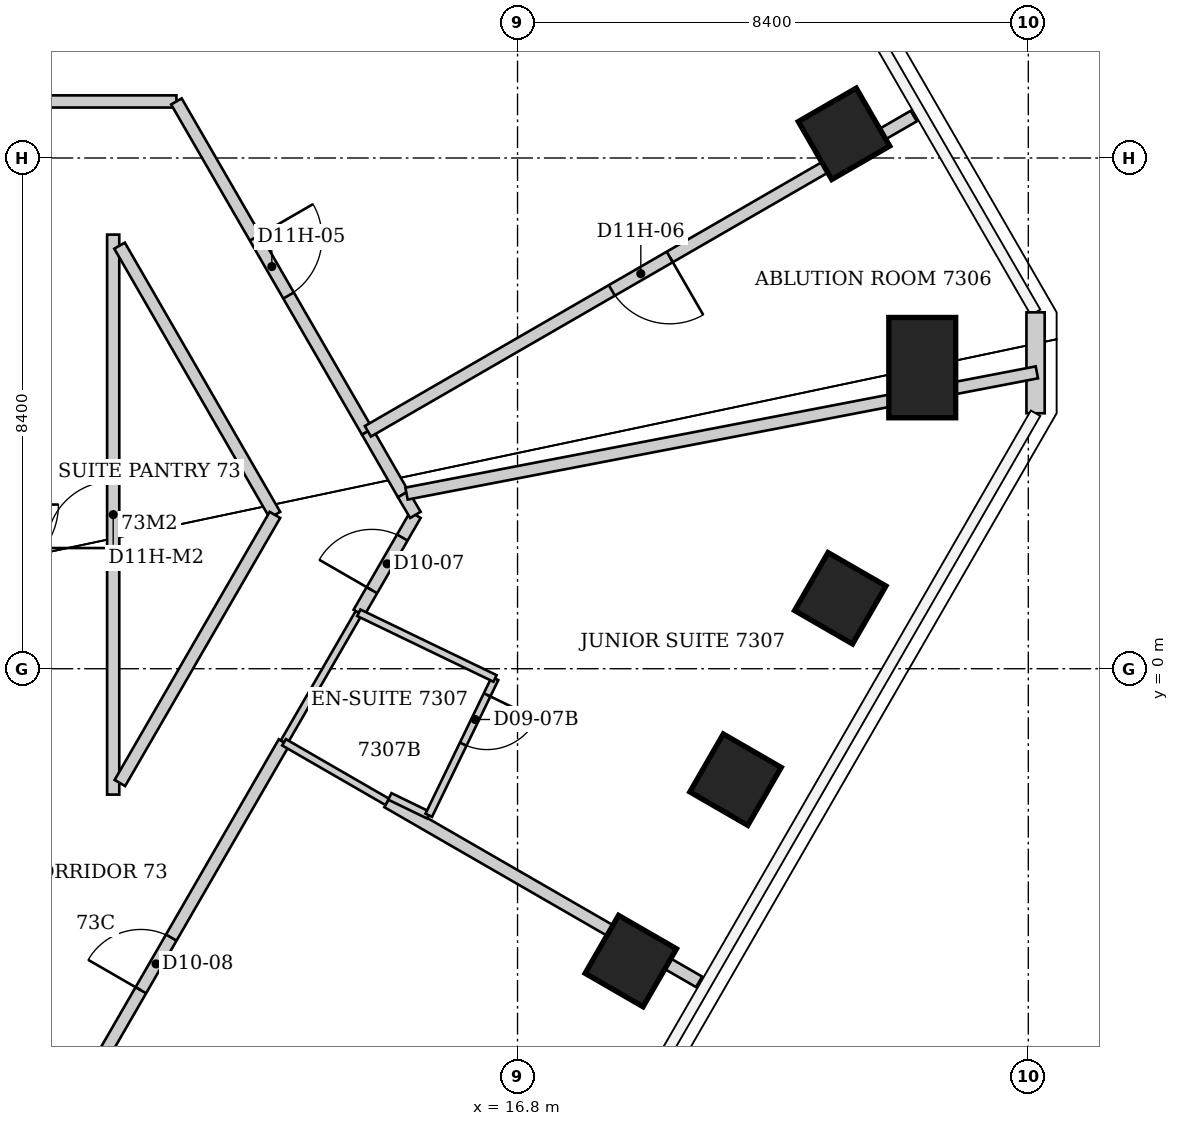
"""IFC4 building model, lengths in metres.
Left out: names, types, materials, properties, quantities, classifications, styles, units other than length and angle.
Written with IfcOpenShell. Run it as: python <this file> out.ifc"""

import sys

from ifc_helpers import new_model, si_unit, direction, frame, frame_2d, origin, origin_2d, place, context, subcontext, project, spatial, rectangle, extrude, element, fill, save


model = new_model("IFC4")
c1 = context("Model", 3, precision=1e-05, world=origin(), true_north=direction((0.0, 1.0)))
c2 = subcontext(c1, "Body", "Model", "MODEL_VIEW")
j1 = project(units=[si_unit("LENGTHUNIT", "METRE"), si_unit("PLANEANGLEUNIT", "RADIAN")], contexts=[c1])
p1 = place(None, origin())
s1 = spatial("IfcSite", under=j1, at=p1, CompositionType="ELEMENT")
p2 = place(p1, origin())
s2 = spatial("IfcBuilding", under=s1, at=p2, CompositionType="ELEMENT")
p3 = place(p2, frame((0.0, 0.0, 291.2)))
s3 = spatial("IfcBuildingStorey", under=s2, at=p3, CompositionType="ELEMENT", Elevation=291.2)
p4 = place(p3, frame((22.169, 8.798, 0.0), z_axis=(0.0, 0.0, 1.0), x_axis=(0.866025403784, 0.5, 0.0)))
e1 = element("IfcColumn", 1, at=p4, inside=s3, PredefinedType="COLUMN", context=c2, shape_type="SweptSolid", body=[
    extrude(rectangle(XDim=1.1, YDim=1.1, at=origin_2d()), origin(), (0.0, 0.0, 1.0), 3.8),
])
p5 = place(p3, frame((23.456, 4.952, 0.0), z_axis=(0.0, 0.0, 1.0), x_axis=(1.0, 0.0, 0.0)))
e2 = element("IfcColumn", 2, at=p5, inside=s3, PredefinedType="COLUMN", context=c2, shape_type="SweptSolid", body=[
    extrude(rectangle(XDim=1.1, YDim=1.65, at=origin_2d()), origin(), (0.0, 0.0, 1.0), 3.8),
])
for number, where, z_axis, x_axis in (
    (3, (22.108, 1.159, 0.0), (0.0, 0.0, 1.0), (0.866, -0.5, 0.0)),
    (4, (20.385, -1.824, 0.0), (0.0, 0.0, 1.0), (0.866, -0.5, 0.0)),
    (5, (18.663, -4.808, 0.0), (0.0, 0.0, 1.0), (0.866, -0.5, 0.0)),
):
    element("IfcColumn", number, at=place(p3, frame(where, z_axis=z_axis, x_axis=x_axis)), inside=s3, PredefinedType="COLUMN", context=c2, shape_type="SweptSolid", body=[
        extrude(rectangle(XDim=1.1, YDim=1.1, at=origin_2d()), origin(), (0.0, 0.0, 1.0), 3.8),
    ])
p6 = place(p3, frame((25.319, 5.862, 0.0), z_axis=(0.0, 0.0, 1.0), x_axis=(0.0, -1.0, 0.0)))
e6 = element("IfcWall", 6, at=p6, inside=s3, PredefinedType="SOLIDWALL", context=c2, shape_type="SweptSolid", body=[
    extrude(rectangle(XDim=1.66, YDim=0.3, at=frame_2d((0.83, 0.0))), origin(), (0.0, 0.0, 1.0), 3.64),
])
p7 = place(p3, frame((8.75, -8.5, 0.0), z_axis=(0.0, 0.0, 1.0), x_axis=(0.500093981358, 0.865971136822, 0.0)))
e7 = element("IfcWall", 7, at=p7, inside=s3, PredefinedType="PARTITIONING", context=c2, shape_type="SweptSolid", body=[
    extrude(rectangle(XDim=8.418, YDim=0.2, at=frame_2d((4.209, 0.0))), origin(), (0.0, 0.0, 1.0), 3.64),
])
p8 = place(p7, frame((3.709, 0.0, 0.0)))
e8 = element("IfcOpeningElement", 8, at=p8, cuts=e7, PredefinedType="OPENING", context=c2, shape_type="SweptSolid", body=[
    extrude(rectangle(XDim=1.0, YDim=2.13, at=frame_2d((0.5, 1.065))), frame((0.0, 0.1, 0.0), z_axis=(0.0, -1.0, 0.0), x_axis=(1.0, 0.0, 0.0)), (0.0, 0.0, 1.0), 0.2),
])
p9 = place(p3, frame((10.15, -2.07, 0.0), z_axis=(0.0, 0.0, 1.0), x_axis=(0.0, 1.0, 0.0)))
e9 = element("IfcWall", 9, at=p9, inside=s3, PredefinedType="PARTITIONING", context=c2, shape_type="SweptSolid", body=[
    extrude(rectangle(XDim=9.21, YDim=0.2, at=frame_2d((4.605, 0.0))), origin(), (0.0, 0.0, 1.0), 3.64),
])
p10 = place(p9, frame((4.055, 0.0, 0.0)))
e10 = element("IfcOpeningElement", 10, at=p10, cuts=e9, PredefinedType="OPENING", context=c2, shape_type="SweptSolid", body=[
    extrude(rectangle(XDim=1.1, YDim=2.2, at=frame_2d((0.55, 1.1))), frame((0.0, 0.1, 0.0), z_axis=(0.0, -1.0, 0.0), x_axis=(1.0, 0.0, 0.0)), (0.0, 0.0, 1.0), 0.2),
])
p11 = place(p3, frame((10.255, 6.958, 0.0), z_axis=(0.0, 0.0, 1.0), x_axis=(0.499806513108, -0.866137084678, 0.0)))
e11 = element("IfcWall", 11, at=p11, inside=s3, PredefinedType="PARTITIONING", context=c2, shape_type="SweptSolid", body=[
    extrude(rectangle(XDim=5.112, YDim=0.2, at=frame_2d((2.556, 0.0))), origin(), (0.0, 0.0, 1.0), 3.64),
])
p12 = place(p3, frame((11.19, 9.33, 0.0), z_axis=(0.0, 0.0, 1.0), x_axis=(-1.0, 0.0, 0.0)))
e12 = element("IfcWall", 12, at=p12, inside=s3, PredefinedType="PARTITIONING", context=c2, shape_type="SweptSolid", body=[
    extrude(rectangle(XDim=3.11, YDim=0.2, at=frame_2d((1.555, 0.0))), origin(), (0.0, 0.0, 1.0), 3.64),
])
p13 = place(p3, frame((11.19, 9.33, 0.0), z_axis=(0.0, 0.0, 1.0), x_axis=(0.500328823945, -0.865835473938, 0.0)))
e13 = element("IfcWall", 13, at=p13, inside=s3, PredefinedType="PARTITIONING", context=c2, shape_type="SweptSolid", body=[
    extrude(rectangle(XDim=6.273, YDim=0.2, at=frame_2d((3.136, 0.0))), origin(), (0.0, 0.0, 1.0), 3.64),
])
p14 = place(p13, frame((2.586, 0.0, 0.0)))
e14 = element("IfcOpeningElement", 14, at=p14, cuts=e13, PredefinedType="OPENING", context=c2, shape_type="SweptSolid", body=[
    extrude(rectangle(XDim=1.1, YDim=2.2, at=frame_2d((0.55, 1.1))), frame((0.0, 0.1, 0.0), z_axis=(0.0, -1.0, 0.0), x_axis=(1.0, 0.0, 0.0)), (0.0, 0.0, 1.0), 0.2),
])
p15 = place(p3, frame((12.81, 2.53, 0.0), z_axis=(0.0, 0.0, 1.0), x_axis=(-0.500571425319, -0.865695239766, 0.0)))
e15 = element("IfcWall", 15, at=p15, inside=s3, PredefinedType="PARTITIONING", context=c2, shape_type="SweptSolid", body=[
    extrude(rectangle(XDim=5.094, YDim=0.2, at=frame_2d((2.547, 0.0))), origin(), (0.0, 0.0, 1.0), 3.64),
])
p16 = place(p3, frame((12.959, -1.209, 0.0), z_axis=(0.0, 0.0, 1.0), x_axis=(0.500472725713, 0.865752303385, 0.0)))
e16 = element("IfcWall", 16, at=p16, inside=s3, PredefinedType="PARTITIONING", context=c2, shape_type="SweptSolid", body=[
    extrude(rectangle(XDim=2.459, YDim=0.12, at=frame_2d((1.23, 0.0))), origin(), (0.0, 0.0, 1.0), 3.64),
])
p17 = place(p3, frame((12.96, -1.21, 0.0), z_axis=(0.0, 0.0, 1.0), x_axis=(0.866075784294, -0.499912728242, 0.0)))
e17 = element("IfcWall", 17, at=p17, inside=s3, PredefinedType="PARTITIONING", context=c2, shape_type="SweptSolid", body=[
    extrude(rectangle(XDim=1.962, YDim=0.12, at=frame_2d((0.981, 0.0))), origin(), (0.0, 0.0, 1.0), 3.64),
])
p18 = place(p3, frame((14.19, 0.92, 0.0), z_axis=(0.0, 0.0, 1.0), x_axis=(0.500233848448, 0.865890349217, 0.0)))
e18 = element("IfcWall", 18, at=p18, inside=s3, PredefinedType="PARTITIONING", context=c2, shape_type="SweptSolid", body=[
    extrude(rectangle(XDim=1.859, YDim=0.2, at=frame_2d((0.93, 0.0))), origin(), (0.0, 0.0, 1.0), 3.64),
])
p19 = place(p18, frame((0.43, 0.0, 0.0)))
e19 = element("IfcOpeningElement", 19, at=p19, cuts=e18, PredefinedType="OPENING", context=c2, shape_type="SweptSolid", body=[
    extrude(rectangle(XDim=1.0, YDim=2.13, at=frame_2d((0.5, 1.065))), frame((0.0, 0.1, 0.0), z_axis=(0.0, -1.0, 0.0), x_axis=(1.0, 0.0, 0.0)), (0.0, 0.0, 1.0), 0.2),
])
p20 = place(p3, frame((14.328, 3.899, 0.0), z_axis=(0.0, 0.0, 1.0), x_axis=(0.498463393977, -0.866910747923, 0.0)))
e20 = element("IfcWall", 20, at=p20, inside=s3, PredefinedType="PARTITIONING", context=c2, shape_type="SweptSolid", body=[
    extrude(rectangle(XDim=1.187, YDim=0.2, at=frame_2d((0.593, 0.0))), origin(), (0.0, 0.0, 1.0), 3.64),
])
p21 = place(p3, frame((14.659, -2.191, 0.0), z_axis=(0.0, 0.0, 1.0), x_axis=(0.866075017274, -0.499914057068, 0.0)))
e21 = element("IfcWall", 21, at=p21, inside=s3, PredefinedType="PARTITIONING", context=c2, shape_type="SweptSolid", body=[
    extrude(rectangle(XDim=5.919, YDim=0.2, at=frame_2d((2.96, 0.0))), origin(), (0.0, 0.0, 1.0), 3.64),
])
p22 = place(p3, frame((14.7, -2.1, 0.0), z_axis=(0.0, 0.0, 1.0), x_axis=(0.900120171182, -0.43564168468, 0.0)))
e22 = element("IfcWall", 22, at=p22, inside=s3, PredefinedType="PARTITIONING", context=c2, shape_type="SweptSolid", body=[
    extrude(rectangle(XDim=0.711, YDim=0.12, at=frame_2d((0.355, 0.0))), origin(), (0.0, 0.0, 1.0), 3.64),
])
p23 = place(p3, frame((14.92, 2.87, 0.0), z_axis=(0.0, 0.0, 1.0), x_axis=(0.507290461451, -0.861775137562, 0.0)))
e23 = element("IfcWall", 23, at=p23, inside=s3, PredefinedType="PARTITIONING", context=c2, shape_type="SweptSolid", body=[
    extrude(rectangle(XDim=0.395, YDim=0.2, at=frame_2d((0.197, 0.0))), origin(), (0.0, 0.0, 1.0), 3.64),
])
p24 = place(p3, frame((15.34, -2.41, 0.0), z_axis=(0.0, 0.0, 1.0), x_axis=(0.435928453727, 0.899981323824, 0.0)))
e24 = element("IfcWall", 24, at=p24, inside=s3, PredefinedType="PARTITIONING", context=c2, shape_type="SweptSolid", body=[
    extrude(rectangle(XDim=2.5, YDim=0.12, at=frame_2d((1.25, 0.0))), origin(), (0.0, 0.0, 1.0), 3.64),
])
p25 = place(p24, frame((1.3, 0.0, 0.0)))
e25 = element("IfcOpeningElement", 25, at=p25, cuts=e24, PredefinedType="OPENING", context=c2, shape_type="SweptSolid", body=[
    extrude(rectangle(XDim=0.9, YDim=2.03, at=frame_2d((0.45, 1.015))), frame((0.0, 0.06, 0.0), z_axis=(0.0, -1.0, 0.0), x_axis=(1.0, 0.0, 0.0)), (0.0, 0.0, 1.0), 0.12),
])
p26 = place(p3, frame((16.43, -0.16, 0.0), z_axis=(0.0, 0.0, 1.0), x_axis=(-0.900794056548, 0.434246551729, 0.0)))
e26 = element("IfcWall", 26, at=p26, inside=s3, PredefinedType="PARTITIONING", context=c2, shape_type="SweptSolid", body=[
    extrude(rectangle(XDim=2.487, YDim=0.12, at=frame_2d((1.243, 0.0))), origin(), (0.0, 0.0, 1.0), 3.64),
])
p27 = place(p3, frame((16.89, 19.507, 0.0), z_axis=(0.0, 0.0, 1.0), x_axis=(-0.654509091565, -0.756054131037, 0.0)))
e27 = element("IfcWall", 27, at=p27, inside=s3, PredefinedType="PARTITIONING", context=c2, shape_type="SweptSolid", body=[
    extrude(rectangle(XDim=13.346, YDim=0.2, at=frame_2d((6.673, 0.0))), origin(), (0.0, 0.0, 1.0), 3.64),
])
p28 = place(p3, frame((23.316, 9.09, 0.0), z_axis=(0.0, 0.0, 1.0), x_axis=(-0.865947121586, -0.50013556424, 0.0)))
e28 = element("IfcWall", 28, at=p28, inside=s3, PredefinedType="PARTITIONING", context=c2, shape_type="SweptSolid", body=[
    extrude(rectangle(XDim=10.367, YDim=0.2, at=frame_2d((5.184, 0.0))), origin(), (0.0, 0.0, 1.0), 3.64),
])
p29 = place(p28, frame((4.634, 0.0, 0.0)))
e29 = element("IfcOpeningElement", 29, at=p29, cuts=e28, PredefinedType="OPENING", context=c2, shape_type="SweptSolid", body=[
    extrude(rectangle(XDim=1.1, YDim=2.2, at=frame_2d((0.55, 1.1))), frame((0.0, 0.1, 0.0), z_axis=(0.0, -1.0, 0.0), x_axis=(1.0, 0.0, 0.0)), (0.0, 0.0, 1.0), 0.2),
])
p30 = place(p3, frame((25.341, 4.874, 0.0), z_axis=(0.0, 0.0, 1.0), x_axis=(-0.982001168061, -0.188874841966, 0.0)))
e30 = element("IfcWall", 30, at=p30, inside=s3, PredefinedType="PARTITIONING", context=c2, shape_type="SweptSolid", body=[
    extrude(rectangle(XDim=10.557, YDim=0.2, at=frame_2d((5.278, 0.0))), origin(), (0.0, 0.0, 1.0), 3.64),
])
p31 = place(p14, origin())
e31 = element("IfcDoor", 31, at=p31, inside=s3, OperationType="SINGLE_SWING_LEFT", PredefinedType="DOOR", context=c2, shape_type="SweptSolid", body=[
    extrude(rectangle(XDim=1.1, YDim=2.2, at=frame_2d((0.55, 1.1))), frame((0.0, 0.025, 0.0), z_axis=(0.0, -1.0, 0.0), x_axis=(1.0, 0.0, 0.0)), (0.0, 0.0, 1.0), 0.05),
])
fill(e14, e31)
p32 = place(p29, origin())
e32 = element("IfcDoor", 32, at=p32, inside=s3, OperationType="SINGLE_SWING_LEFT", PredefinedType="DOOR", context=c2, shape_type="SweptSolid", body=[
    extrude(rectangle(XDim=1.1, YDim=2.2, at=frame_2d((0.55, 1.1))), frame((0.0, 0.025, 0.0), z_axis=(0.0, -1.0, 0.0), x_axis=(1.0, 0.0, 0.0)), (0.0, 0.0, 1.0), 0.05),
])
fill(e29, e32)
p33 = place(p19, origin())
e33 = element("IfcDoor", 33, at=p33, inside=s3, OperationType="SINGLE_SWING_LEFT", PredefinedType="DOOR", context=c2, shape_type="SweptSolid", body=[
    extrude(rectangle(XDim=1.0, YDim=2.13, at=frame_2d((0.5, 1.065))), frame((0.0, 0.025, 0.0), z_axis=(0.0, -1.0, 0.0), x_axis=(1.0, 0.0, 0.0)), (0.0, 0.0, 1.0), 0.05),
])
fill(e19, e33)
p34 = place(p25, origin())
e34 = element("IfcDoor", 34, at=p34, inside=s3, OperationType="SINGLE_SWING_RIGHT", PredefinedType="DOOR", context=c2, shape_type="SweptSolid", body=[
    extrude(rectangle(XDim=0.9, YDim=2.03, at=frame_2d((0.45, 1.015))), frame((0.0, 0.025, 0.0), z_axis=(0.0, -1.0, 0.0), x_axis=(1.0, 0.0, 0.0)), (0.0, 0.0, 1.0), 0.05),
])
fill(e25, e34)
p35 = place(p8, origin())
e35 = element("IfcDoor", 35, at=p35, inside=s3, OperationType="SINGLE_SWING_LEFT", PredefinedType="DOOR", context=c2, shape_type="SweptSolid", body=[
    extrude(rectangle(XDim=1.0, YDim=2.13, at=frame_2d((0.5, 1.065))), frame((0.0, 0.025, 0.0), z_axis=(0.0, -1.0, 0.0), x_axis=(1.0, 0.0, 0.0)), (0.0, 0.0, 1.0), 0.05),
])
fill(e8, e35)
p36 = place(p10, origin())
e36 = element("IfcDoor", 36, at=p36, inside=s3, OperationType="SINGLE_SWING_LEFT", PredefinedType="DOOR", context=c2, shape_type="SweptSolid", body=[
    extrude(rectangle(XDim=1.1, YDim=2.2, at=frame_2d((0.55, 1.1))), frame((0.0, 0.025, 0.0), z_axis=(0.0, -1.0, 0.0), x_axis=(1.0, 0.0, 0.0)), (0.0, 0.0, 1.0), 0.05),
])
fill(e10, e36)
save(model, sys.argv[1])
